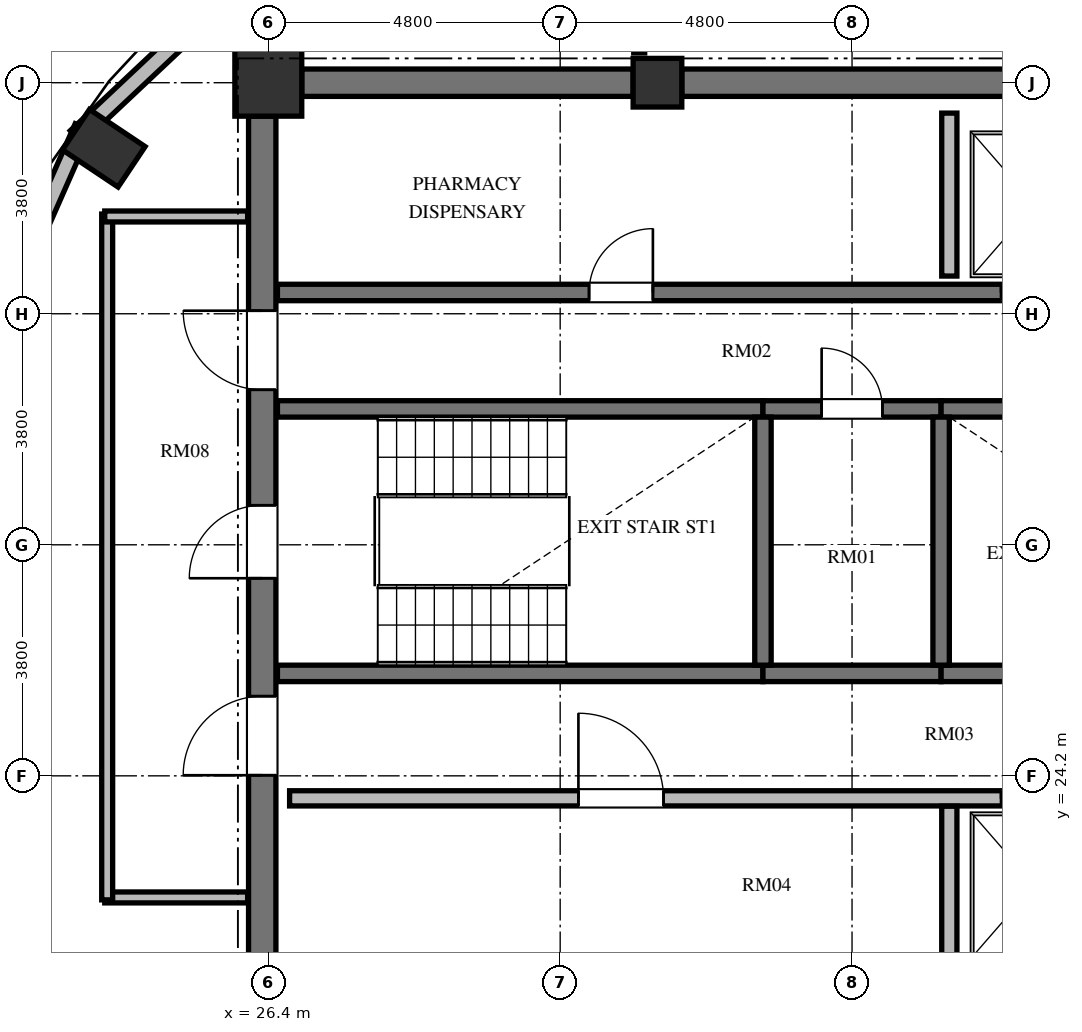
"""IFC4 building model, lengths in metres.
Left out: names, types, materials, properties, quantities, classifications, styles, units other than length and angle.
Written with IfcOpenShell. Run it as: python <this file> out.ifc"""

import sys

from ifc_helpers import new_model, si_unit, direction, frame, frame_2d, origin, origin_2d, place, context, subcontext, project, spatial, rectangle, extrude, element, fill, save


model = new_model("IFC4")
c1 = context("Model", 3, precision=1e-05, world=origin(), true_north=direction((0.0, 1.0)))
c2 = subcontext(c1, "Body", "Model", "MODEL_VIEW")
j1 = project(units=[si_unit("LENGTHUNIT", "METRE"), si_unit("PLANEANGLEUNIT", "RADIAN")], contexts=[c1])
p1 = place(None, origin())
s1 = spatial("IfcSite", under=j1, at=p1, CompositionType="ELEMENT")
p2 = place(p1, origin())
s2 = spatial("IfcBuilding", under=s1, at=p2, CompositionType="ELEMENT")
p3 = place(p2, frame((0.0, 0.0, 287.856)))
s3 = spatial("IfcBuildingStorey", under=s2, at=p3, CompositionType="ELEMENT", Elevation=287.856)
p4 = place(p3, frame((23.694, 34.522, 0.0), z_axis=(0.0, 0.0, 1.0), x_axis=(-0.831469612303, 0.55557023302, 0.0)))
e1 = element("IfcColumn", 1, at=p4, inside=s3, PredefinedType="COLUMN", context=c2, shape_type="SweptSolid", body=[
    extrude(rectangle(XDim=1.1, YDim=0.8, at=origin_2d()), origin(), (0.0, 0.0, 1.0), 3.648),
])
p5 = place(p3, frame((32.8, 35.6, 0.0), z_axis=(0.0, 0.0, 1.0), x_axis=(1.0, 0.0, 0.0)))
e2 = element("IfcColumn", 2, at=p5, inside=s3, PredefinedType="COLUMN", context=c2, shape_type="SweptSolid", body=[
    extrude(rectangle(XDim=0.8, YDim=0.8, at=origin_2d()), origin(), (0.0, 0.0, 1.0), 3.648),
])
p6 = place(p3, frame((26.4, 35.6, 0.0), z_axis=(0.0, 0.0, 1.0), x_axis=(1.0, 0.0, 0.0)))
e3 = element("IfcColumn", 3, at=p6, inside=s3, PredefinedType="COLUMN", context=c2, shape_type="SweptSolid", body=[
    extrude(rectangle(XDim=1.1, YDim=1.1, at=origin_2d()), origin(), (0.0, 0.0, 1.0), 3.648),
])
p7 = place(p3, frame((26.3, 20.95, 0.0), z_axis=(0.0, 0.0, 1.0), x_axis=(0.0, 1.0, 0.0)))
e4 = element("IfcWall", 4, at=p7, inside=s3, PredefinedType="SHEAR", context=c2, shape_type="SweptSolid", body=[
    extrude(rectangle(XDim=14.1, YDim=0.45, at=frame_2d((7.05, 0.0))), origin(), (0.0, 0.0, 1.0), 3.648),
])
p8 = place(p7, frame((6.5, 0.0, 0.0)))
e5 = element("IfcOpeningElement", 5, at=p8, cuts=e4, PredefinedType="OPENING", context=c2, shape_type="SweptSolid", body=[
    extrude(rectangle(XDim=1.2, YDim=2.15, at=frame_2d((0.6, 1.075))), frame((0.0, 0.235, 0.0), z_axis=(0.0, -1.0, 0.0), x_axis=(1.0, 0.0, 0.0)), (0.0, 0.0, 1.0), 0.47),
])
p9 = place(p7, frame((9.6, 0.0, 0.0)))
e6 = element("IfcOpeningElement", 6, at=p9, cuts=e4, PredefinedType="OPENING", context=c2, shape_type="SweptSolid", body=[
    extrude(rectangle(XDim=1.3, YDim=2.2, at=frame_2d((0.65, 1.1))), frame((0.0, 0.235, 0.0), z_axis=(0.0, -1.0, 0.0), x_axis=(1.0, 0.0, 0.0)), (0.0, 0.0, 1.0), 0.47),
])
p10 = place(p7, frame((3.26, 0.0, 0.0)))
e7 = element("IfcOpeningElement", 7, at=p10, cuts=e4, PredefinedType="OPENING", context=c2, shape_type="SweptSolid", body=[
    extrude(rectangle(XDim=1.3, YDim=2.2, at=frame_2d((0.65, 1.1))), frame((0.0, 0.235, 0.0), z_axis=(0.0, -1.0, 0.0), x_axis=(1.0, 0.0, 0.0)), (0.0, 0.0, 1.0), 0.47),
])
p11 = place(p3, frame((26.95, 35.6, 0.0), z_axis=(0.0, 0.0, 1.0), x_axis=(1.0, 0.0, 0.0)))
e8 = element("IfcWall", 8, at=p11, inside=s3, PredefinedType="SHEAR", context=c2, shape_type="SweptSolid", body=[
    extrude(rectangle(XDim=5.45, YDim=0.45, at=frame_2d((2.725, 0.0))), origin(), (0.0, 0.0, 1.0), 3.648),
])
p12 = place(p3, frame((33.2, 35.6, 0.0), z_axis=(0.0, 0.0, 1.0), x_axis=(1.0, 0.0, 0.0)))
e9 = element("IfcWall", 9, at=p12, inside=s3, PredefinedType="SHEAR", context=c2, shape_type="SweptSolid", body=[
    extrude(rectangle(XDim=5.6, YDim=0.45, at=frame_2d((2.8, 0.0))), origin(), (0.0, 0.0, 1.0), 3.648),
])
p13 = place(p3, frame((27.595, 38.808, 0.0), z_axis=(0.0, 0.0, 1.0), x_axis=(-0.728251519923, -0.685309947199, 0.0)))
e10 = element("IfcWall", 10, at=p13, inside=s3, PredefinedType="SOLIDWALL", context=c2, shape_type="SweptSolid", body=[
    extrude(rectangle(XDim=5.981, YDim=0.28, at=frame_2d((2.99, 0.0))), origin(), (0.0, 0.0, 1.0), 3.448),
])
p14 = place(p13, frame((2.391, 0.0, 0.85)))
e11 = element("IfcOpeningElement", 11, at=p14, cuts=e10, PredefinedType="OPENING", context=c2, shape_type="SweptSolid", body=[
    extrude(rectangle(XDim=1.2, YDim=1.8, at=frame_2d((0.6, 0.9))), frame((0.0, 0.15, 0.0), z_axis=(0.0, -1.0, 0.0), x_axis=(1.0, 0.0, 0.0)), (0.0, 0.0, 1.0), 0.3),
])
p15 = place(p3, frame((23.352, 34.869, 0.0), z_axis=(0.0, 0.0, 1.0), x_axis=(-0.402882523888, -0.915251698685, 0.0)))
e12 = element("IfcWall", 12, at=p15, inside=s3, PredefinedType="SOLIDWALL", context=c2, shape_type="SweptSolid", body=[
    extrude(rectangle(XDim=5.856, YDim=0.28, at=frame_2d((2.928, 0.0))), origin(), (0.0, 0.0, 1.0), 3.448),
])
p16 = place(p15, frame((2.328, 0.0, 0.85)))
e13 = element("IfcOpeningElement", 13, at=p16, cuts=e12, PredefinedType="OPENING", context=c2, shape_type="SweptSolid", body=[
    extrude(rectangle(XDim=1.2, YDim=1.8, at=frame_2d((0.6, 0.9))), frame((0.0, 0.15, 0.0), z_axis=(0.0, -1.0, 0.0), x_axis=(1.0, 0.0, 0.0)), (0.0, 0.0, 1.0), 0.3),
])
p17 = place(p3, frame((20.993, 24.09, 0.0), z_axis=(0.0, 0.0, 1.0), x_axis=(0.402867150469, -0.91525846572, 0.0)))
e14 = element("IfcWall", 14, at=p17, inside=s3, PredefinedType="SOLIDWALL", context=c2, shape_type="SweptSolid", body=[
    extrude(rectangle(XDim=5.856, YDim=0.28, at=frame_2d((2.928, 0.0))), origin(), (0.0, 0.0, 1.0), 3.448),
])
p18 = place(p17, frame((2.328, 0.0, 0.85)))
e15 = element("IfcOpeningElement", 15, at=p18, cuts=e14, PredefinedType="OPENING", context=c2, shape_type="SweptSolid", body=[
    extrude(rectangle(XDim=1.2, YDim=1.8, at=frame_2d((0.6, 0.9))), frame((0.0, 0.15, 0.0), z_axis=(0.0, -1.0, 0.0), x_axis=(1.0, 0.0, 0.0)), (0.0, 0.0, 1.0), 0.3),
])
p19 = place(p3, frame((26.55, 30.235, 0.0), z_axis=(0.0, 0.0, 1.0), x_axis=(1.0, 0.0, 0.0)))
e16 = element("IfcWall", 16, at=p19, inside=s3, PredefinedType="SHEAR", context=c2, shape_type="SweptSolid", body=[
    extrude(rectangle(XDim=7.985, YDim=0.27, at=frame_2d((3.992, 0.0))), origin(), (0.0, 0.0, 1.0), 3.648),
])
p20 = place(p3, frame((34.535, 30.235, 0.0), z_axis=(0.0, 0.0, 1.0), x_axis=(1.0, 0.0, 0.0)))
e17 = element("IfcWall", 17, at=p20, inside=s3, PredefinedType="SHEAR", context=c2, shape_type="SweptSolid", body=[
    extrude(rectangle(XDim=2.93, YDim=0.27, at=frame_2d((1.465, 0.0))), origin(), (0.0, 0.0, 1.0), 3.648),
])
p21 = place(p20, frame((0.965, 0.0, 0.0)))
e18 = element("IfcOpeningElement", 18, at=p21, cuts=e17, PredefinedType="OPENING", context=c2, shape_type="SweptSolid", body=[
    extrude(rectangle(XDim=1.0, YDim=2.1, at=frame_2d((0.5, 1.05))), frame((0.0, 0.145, 0.0), z_axis=(0.0, -1.0, 0.0), x_axis=(1.0, 0.0, 0.0)), (0.0, 0.0, 1.0), 0.29),
])
p22 = place(p3, frame((37.465, 30.235, 0.0), z_axis=(0.0, 0.0, 1.0), x_axis=(1.0, 0.0, 0.0)))
e19 = element("IfcWall", 19, at=p22, inside=s3, PredefinedType="SHEAR", context=c2, shape_type="SweptSolid", body=[
    extrude(rectangle(XDim=7.985, YDim=0.27, at=frame_2d((3.992, 0.0))), origin(), (0.0, 0.0, 1.0), 3.648),
])
p23 = place(p22, frame((6.455, 0.0, 0.0)))
e20 = element("IfcOpeningElement", 20, at=p23, cuts=e19, PredefinedType="OPENING", context=c2, shape_type="SweptSolid", body=[
    extrude(rectangle(XDim=1.2, YDim=2.15, at=frame_2d((0.6, 1.075))), frame((0.0, 0.145, 0.0), z_axis=(0.0, -1.0, 0.0), x_axis=(1.0, 0.0, 0.0)), (0.0, 0.0, 1.0), 0.29),
])
p24 = place(p3, frame((26.55, 25.885, 0.0), z_axis=(0.0, 0.0, 1.0), x_axis=(1.0, 0.0, 0.0)))
e21 = element("IfcWall", 21, at=p24, inside=s3, PredefinedType="SHEAR", context=c2, shape_type="SweptSolid", body=[
    extrude(rectangle(XDim=7.985, YDim=0.27, at=frame_2d((3.992, 0.0))), origin(), (0.0, 0.0, 1.0), 3.648),
])
p25 = place(p3, frame((34.535, 25.885, 0.0), z_axis=(0.0, 0.0, 1.0), x_axis=(1.0, 0.0, 0.0)))
e22 = element("IfcWall", 22, at=p25, inside=s3, PredefinedType="SHEAR", context=c2, shape_type="SweptSolid", body=[
    extrude(rectangle(XDim=2.93, YDim=0.27, at=frame_2d((1.465, 0.0))), origin(), (0.0, 0.0, 1.0), 3.648),
])
p26 = place(p3, frame((37.465, 25.885, 0.0), z_axis=(0.0, 0.0, 1.0), x_axis=(1.0, 0.0, 0.0)))
e23 = element("IfcWall", 23, at=p26, inside=s3, PredefinedType="SHEAR", context=c2, shape_type="SweptSolid", body=[
    extrude(rectangle(XDim=7.985, YDim=0.27, at=frame_2d((3.992, 0.0))), origin(), (0.0, 0.0, 1.0), 3.648),
])
for number, where, z_axis, x_axis in (
    (24, (34.535, 26.02, 0.0), (0.0, 0.0, 1.0), (0.0, 1.0, 0.0)),
    (25, (37.465, 26.02, 0.0), (0.0, 0.0, 1.0), (0.0, 1.0, 0.0)),
):
    element("IfcWall", number, at=place(p3, frame(where, z_axis=z_axis, x_axis=x_axis)), inside=s3, PredefinedType="SHEAR", context=c2, shape_type="SweptSolid", body=[
        extrude(rectangle(XDim=4.08, YDim=0.27, at=frame_2d((2.04, 0.0))), origin(), (0.0, 0.0, 1.0), 3.648),
    ])
p27 = place(p3, frame((26.55, 32.15, 0.0), z_axis=(0.0, 0.0, 1.0), x_axis=(1.0, 0.0, 0.0)))
e26 = element("IfcWall", 26, at=p27, inside=s3, PredefinedType="SHEAR", context=c2, shape_type="SweptSolid", body=[
    extrude(rectangle(XDim=16.4, YDim=0.27, at=frame_2d((8.2, 0.0))), origin(), (0.0, 0.0, 1.0), 3.648),
])
p28 = place(p27, frame((5.125, 0.0, 0.0)))
e27 = element("IfcOpeningElement", 27, at=p28, cuts=e26, PredefinedType="OPENING", context=c2, shape_type="SweptSolid", body=[
    extrude(rectangle(XDim=1.05, YDim=2.15, at=frame_2d((0.525, 1.075))), frame((0.0, 0.145, 0.0), z_axis=(0.0, -1.0, 0.0), x_axis=(1.0, 0.0, 0.0)), (0.0, 0.0, 1.0), 0.29),
])
p29 = place(p27, frame((11.9, 0.0, 0.0)))
e28 = element("IfcOpeningElement", 28, at=p29, cuts=e26, PredefinedType="OPENING", context=c2, shape_type="SweptSolid", body=[
    extrude(rectangle(XDim=1.1, YDim=2.2, at=frame_2d((0.55, 1.1))), frame((0.0, 0.145, 0.0), z_axis=(0.0, -1.0, 0.0), x_axis=(1.0, 0.0, 0.0)), (0.0, 0.0, 1.0), 0.29),
])
p30 = place(p27, frame((14.5, 0.0, 0.0)))
e29 = element("IfcOpeningElement", 29, at=p30, cuts=e26, PredefinedType="OPENING", context=c2, shape_type="SweptSolid", body=[
    extrude(rectangle(XDim=1.1, YDim=2.2, at=frame_2d((0.55, 1.1))), frame((0.0, 0.145, 0.0), z_axis=(0.0, -1.0, 0.0), x_axis=(1.0, 0.0, 0.0)), (0.0, 0.0, 1.0), 0.29),
])
p31 = place(p3, frame((26.75, 23.83, 0.0), z_axis=(0.0, 0.0, 1.0), x_axis=(1.0, 0.0, 0.0)))
e30 = element("IfcWall", 30, at=p31, inside=s3, PredefinedType="SOLIDWALL", context=c2, shape_type="SweptSolid", body=[
    extrude(rectangle(XDim=16.2, YDim=0.25, at=frame_2d((8.1, 0.0))), origin(), (0.0, 0.0, 1.0), 3.448),
])
p32 = place(p31, frame((4.75, 0.0, 0.0)))
e31 = element("IfcOpeningElement", 31, at=p32, cuts=e30, PredefinedType="OPENING", context=c2, shape_type="SweptSolid", body=[
    extrude(rectangle(XDim=1.4, YDim=2.2, at=frame_2d((0.7, 1.1))), frame((0.0, 0.135, 0.0), z_axis=(0.0, -1.0, 0.0), x_axis=(1.0, 0.0, 0.0)), (0.0, 0.0, 1.0), 0.27),
])
p33 = place(p31, frame((11.7, 0.0, 0.0)))
e32 = element("IfcOpeningElement", 32, at=p33, cuts=e30, PredefinedType="OPENING", context=c2, shape_type="SweptSolid", body=[
    extrude(rectangle(XDim=1.1, YDim=2.2, at=frame_2d((0.55, 1.1))), frame((0.0, 0.135, 0.0), z_axis=(0.0, -1.0, 0.0), x_axis=(1.0, 0.0, 0.0)), (0.0, 0.0, 1.0), 0.27),
])
p34 = place(p31, frame((14.15, 0.0, 0.0)))
e33 = element("IfcOpeningElement", 33, at=p34, cuts=e30, PredefinedType="OPENING", context=c2, shape_type="SweptSolid", body=[
    extrude(rectangle(XDim=1.4, YDim=2.3, at=frame_2d((0.7, 1.15))), frame((0.0, 0.135, 0.0), z_axis=(0.0, -1.0, 0.0), x_axis=(1.0, 0.0, 0.0)), (0.0, 0.0, 1.0), 0.27),
])
p35 = place(p3, frame((37.6, 32.42, 0.0), z_axis=(0.0, 0.0, 1.0), x_axis=(0.0, 1.0, 0.0)))
e34 = element("IfcWall", 34, at=p35, inside=s3, PredefinedType="SOLIDWALL", context=c2, shape_type="SweptSolid", body=[
    extrude(rectangle(XDim=2.68, YDim=0.25, at=frame_2d((1.34, 0.0))), origin(), (0.0, 0.0, 1.0), 3.448),
])
p36 = place(p3, frame((37.6, 20.9, 0.0), z_axis=(0.0, 0.0, 1.0), x_axis=(0.0, 1.0, 0.0)))
e35 = element("IfcWall", 35, at=p36, inside=s3, PredefinedType="SOLIDWALL", context=c2, shape_type="SweptSolid", body=[
    extrude(rectangle(XDim=2.8, YDim=0.25, at=frame_2d((1.4, 0.0))), origin(), (0.0, 0.0, 1.0), 3.448),
])
p37 = place(p3, frame((32.5, 36.09, 0.0), z_axis=(0.0, 0.0, 1.0), x_axis=(0.0, 1.0, 0.0)))
e36 = element("IfcWall", 36, at=p37, inside=s3, PredefinedType="PARTITIONING", context=c2, shape_type="SweptSolid", body=[
    extrude(rectangle(XDim=2.35, YDim=0.18, at=frame_2d((1.175, 0.0))), origin(), (0.0, 0.0, 1.0), 3.448),
])
p38 = place(p3, frame((26.06, 22.2, 0.0), z_axis=(0.0, 0.0, 1.0), x_axis=(-1.0, 0.0, 0.0)))
e37 = element("IfcWall", 37, at=p38, inside=s3, PredefinedType="PARTITIONING", context=c2, shape_type="SweptSolid", body=[
    extrude(rectangle(XDim=2.35, YDim=0.18, at=frame_2d((1.175, 0.0))), origin(), (0.0, 0.0, 1.0), 3.448),
])
p39 = place(p3, frame((23.75, 22.16, 0.0), z_axis=(0.0, 0.0, 1.0), x_axis=(0.0, 1.0, 0.0)))
e38 = element("IfcWall", 38, at=p39, inside=s3, PredefinedType="PARTITIONING", context=c2, shape_type="SweptSolid", body=[
    extrude(rectangle(XDim=11.28, YDim=0.18, at=frame_2d((5.64, 0.0))), origin(), (0.0, 0.0, 1.0), 3.448),
])
p40 = place(p3, frame((23.71, 33.4, 0.0), z_axis=(0.0, 0.0, 1.0), x_axis=(1.0, 0.0, 0.0)))
e39 = element("IfcWall", 39, at=p40, inside=s3, PredefinedType="PARTITIONING", context=c2, shape_type="SweptSolid", body=[
    extrude(rectangle(XDim=2.35, YDim=0.18, at=frame_2d((1.175, 0.0))), origin(), (0.0, 0.0, 1.0), 3.448),
])
p41 = place(p8, origin())
e40 = element("IfcDoor", 40, at=p41, inside=s3, OperationType="SINGLE_SWING_LEFT", PredefinedType="DOOR", context=c2, shape_type="SweptSolid", body=[
    extrude(rectangle(XDim=1.2, YDim=2.15, at=frame_2d((0.6, 1.075))), frame((0.0, 0.025, 0.0), z_axis=(0.0, -1.0, 0.0), x_axis=(1.0, 0.0, 0.0)), (0.0, 0.0, 1.0), 0.05),
])
fill(e5, e40)
p42 = place(p21, origin())
e41 = element("IfcDoor", 41, at=p42, inside=s3, OperationType="SINGLE_SWING_LEFT", PredefinedType="DOOR", context=c2, shape_type="SweptSolid", body=[
    extrude(rectangle(XDim=1.0, YDim=2.1, at=frame_2d((0.5, 1.05))), frame((0.0, 0.025, 0.0), z_axis=(0.0, -1.0, 0.0), x_axis=(1.0, 0.0, 0.0)), (0.0, 0.0, 1.0), 0.05),
])
fill(e18, e41)
p43 = place(p9, origin())
e42 = element("IfcDoor", 42, at=p43, inside=s3, OperationType="SINGLE_SWING_RIGHT", PredefinedType="DOOR", context=c2, shape_type="SweptSolid", body=[
    extrude(rectangle(XDim=1.3, YDim=2.2, at=frame_2d((0.65, 1.1))), frame((0.0, 0.025, 0.0), z_axis=(0.0, -1.0, 0.0), x_axis=(1.0, 0.0, 0.0)), (0.0, 0.0, 1.0), 0.05),
])
fill(e6, e42)
p44 = place(p10, origin())
e43 = element("IfcDoor", 43, at=p44, inside=s3, OperationType="SINGLE_SWING_LEFT", PredefinedType="DOOR", context=c2, shape_type="SweptSolid", body=[
    extrude(rectangle(XDim=1.3, YDim=2.2, at=frame_2d((0.65, 1.1))), frame((0.0, 0.025, 0.0), z_axis=(0.0, -1.0, 0.0), x_axis=(1.0, 0.0, 0.0)), (0.0, 0.0, 1.0), 0.05),
])
fill(e7, e43)
p45 = place(p28, origin())
e44 = element("IfcDoor", 44, at=p45, inside=s3, OperationType="SINGLE_SWING_RIGHT", PredefinedType="DOOR", context=c2, shape_type="SweptSolid", body=[
    extrude(rectangle(XDim=1.05, YDim=2.15, at=frame_2d((0.525, 1.075))), frame((0.0, 0.025, 0.0), z_axis=(0.0, -1.0, 0.0), x_axis=(1.0, 0.0, 0.0)), (0.0, 0.0, 1.0), 0.05),
])
fill(e27, e44)
p46 = place(p32, origin())
e45 = element("IfcDoor", 45, at=p46, inside=s3, OperationType="SINGLE_SWING_LEFT", PredefinedType="DOOR", context=c2, shape_type="SweptSolid", body=[
    extrude(rectangle(XDim=1.4, YDim=2.2, at=frame_2d((0.7, 1.1))), frame((0.0, 0.025, 0.0), z_axis=(0.0, -1.0, 0.0), x_axis=(1.0, 0.0, 0.0)), (0.0, 0.0, 1.0), 0.05),
])
fill(e31, e45)
p47 = place(p29, origin())
e46 = element("IfcDoor", 46, at=p47, inside=s3, OperationType="SLIDING_TO_LEFT", PredefinedType="DOOR", context=c2, shape_type="SweptSolid", body=[
    extrude(rectangle(XDim=1.1, YDim=2.2, at=frame_2d((0.55, 1.1))), frame((0.0, 0.025, 0.0), z_axis=(0.0, -1.0, 0.0), x_axis=(1.0, 0.0, 0.0)), (0.0, 0.0, 1.0), 0.05),
])
fill(e28, e46)
p48 = place(p33, origin())
e47 = element("IfcDoor", 47, at=p48, inside=s3, OperationType="SLIDING_TO_LEFT", PredefinedType="DOOR", context=c2, shape_type="SweptSolid", body=[
    extrude(rectangle(XDim=1.1, YDim=2.2, at=frame_2d((0.55, 1.1))), frame((0.0, 0.025, 0.0), z_axis=(0.0, -1.0, 0.0), x_axis=(1.0, 0.0, 0.0)), (0.0, 0.0, 1.0), 0.05),
])
fill(e32, e47)
save(model, sys.argv[1])
